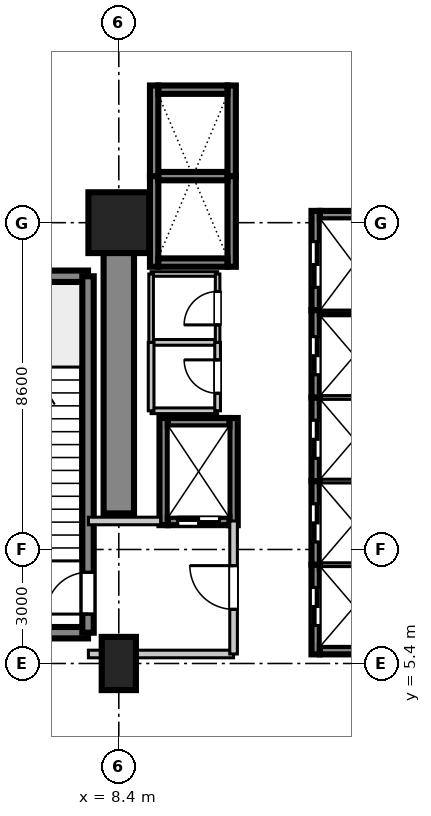
"""IFC4 building model, lengths in metres.
Left out: names, types, materials, properties, quantities, classifications, styles, units other than length and angle.
Written with IfcOpenShell. Run it as: python <this file> out.ifc"""

import sys

from ifc_helpers import new_model, si_unit, direction, frame, frame_2d, origin, origin_2d, place, context, subcontext, project, spatial, rectangle, extrude, source, transform, mapped, element, fill, save


model = new_model("IFC4")
c1 = context("Model", 3, precision=1e-05, world=origin(), true_north=direction((0.0, 1.0)))
c2 = subcontext(c1, "Body", "Model", "MODEL_VIEW")
j1 = project(units=[si_unit("LENGTHUNIT", "METRE"), si_unit("PLANEANGLEUNIT", "RADIAN")], contexts=[c1])
p1 = place(None, origin())
s1 = spatial("IfcSite", under=j1, at=p1, CompositionType="ELEMENT")
p2 = place(p1, origin())
s2 = spatial("IfcBuilding", under=s1, at=p2, CompositionType="ELEMENT")
p3 = place(p2, frame((0.0, 0.0, 10.8)))
s3 = spatial("IfcBuildingStorey", under=s2, at=p3, CompositionType="ELEMENT", Elevation=10.8)
m1 = source(origin(), c2, "Body", "SweptSolid", [
    extrude(rectangle(XDim=0.9, YDim=1.4, at=origin_2d()), origin(), (0.0, 0.0, 1.0), 5.355),
])
p4 = place(p3, frame((8.4, 5.4, 0.0), z_axis=(0.0, 0.0, 1.0), x_axis=(1.0, 0.0, 0.0)))
e1 = element("IfcColumn", 1, at=p4, inside=s3, PredefinedType="PILASTER", context=c2, shape_type="MappedRepresentation", body=[
    mapped(m1, transform((0.0, 0.0, 0.0), scale=1.0)),
])
m2 = source(origin(), c2, "Body", "SweptSolid", [
    extrude(rectangle(XDim=1.6, YDim=1.6, at=origin_2d()), origin(), (0.0, 0.0, 1.0), 5.355),
])
p5 = place(p3, frame((8.4, 17.0, 0.0), z_axis=(0.0, 0.0, 1.0), x_axis=(1.0, 0.0, 0.0)))
e2 = element("IfcColumn", 2, at=p5, inside=s3, PredefinedType="COLUMN", context=c2, shape_type="MappedRepresentation", body=[
    mapped(m2, transform((0.0, 0.0, 0.0), scale=1.0)),
])
m3 = source(origin(), c2, "Body", "SweptSolid", [
    extrude(rectangle(XDim=7.65, YDim=0.8, at=frame_2d((3.825, 0.0))), origin(), (0.0, 0.0, 1.0), 5.06),
])
p6 = place(p3, frame((8.4, 9.35, 0.0), z_axis=(0.0, 0.0, 1.0), x_axis=(0.0, 1.0, 0.0)))
e3 = element("IfcWall", 3, at=p6, inside=s3, PredefinedType="SHEAR", context=c2, shape_type="MappedRepresentation", body=[
    mapped(m3, transform((0.0, 0.0, 0.0), scale=1.0)),
])
m4 = source(origin(), c2, "Body", "SweptSolid", [
    extrude(rectangle(XDim=3.98, YDim=0.3, at=frame_2d((1.99, 0.0))), origin(), (0.0, 0.0, 1.0), 5.06),
])
for number, where, z_axis, x_axis in (
    (4, (3.61, 6.21, 0.0), (0.0, 0.0, 1.0), (1.0, 0.0, 0.0)),
    (5, (3.61, 15.59, 0.0), (0.0, 0.0, 1.0), (1.0, 0.0, 0.0)),
):
    element("IfcWall", number, at=place(p3, frame(where, z_axis=z_axis, x_axis=x_axis)), inside=s3, PredefinedType="SHEAR", context=c2, shape_type="MappedRepresentation", body=[
        mapped(m4, transform((0.0, 0.0, 0.0), scale=1.0)),
    ])
m5 = source(origin(), c2, "Body", "SweptSolid", [
    extrude(rectangle(XDim=9.38, YDim=0.3, at=frame_2d((4.69, 0.0))), origin(), (0.0, 0.0, 1.0), 5.06),
])
p7 = place(p3, frame((7.59, 6.21, 0.0), z_axis=(0.0, 0.0, 1.0), x_axis=(0.0, 1.0, 0.0)))
e6 = element("IfcWall", 6, at=p7, inside=s3, PredefinedType="SHEAR", context=c2, shape_type="MappedRepresentation", body=[
    mapped(m5, transform((0.0, 0.0, 0.0), scale=1.0)),
])
p8 = place(p7, frame((0.49, 0.0, 0.0)))
e7 = element("IfcOpeningElement", 7, at=p8, cuts=e6, PredefinedType="OPENING", context=c2, shape_type="SweptSolid", body=[
    extrude(rectangle(XDim=1.1, YDim=2.15, at=frame_2d((0.55, 1.075))), frame((0.0, 0.16, 0.0), z_axis=(0.0, -1.0, 0.0), x_axis=(1.0, 0.0, 0.0)), (0.0, 0.0, 1.0), 0.32),
])
m6 = source(origin(), c2, "Body", "SweptSolid", [
    extrude(rectangle(XDim=2.36, YDim=0.22, at=frame_2d((1.18, 0.0))), origin(), (0.0, 0.0, 1.0), 5.06),
])
p9 = place(p3, frame((13.58, 5.64, 0.0), z_axis=(0.0, 0.0, 1.0), x_axis=(0.0, 1.0, 0.0)))
e8 = element("IfcWall", 8, at=p9, inside=s3, PredefinedType="SHEAR", context=c2, shape_type="MappedRepresentation", body=[
    mapped(m6, transform((0.0, 0.0, 0.0), scale=1.0)),
])
p10 = place(p9, frame((0.76, 0.0, 0.0)))
e9 = element("IfcOpeningElement", 9, at=p10, cuts=e8, PredefinedType="OPENING", context=c2, shape_type="SweptSolid", body=[
    extrude(rectangle(XDim=1.0, YDim=2.2, at=frame_2d((0.5, 1.1))), frame((0.0, 0.12, 0.0), z_axis=(0.0, -1.0, 0.0), x_axis=(1.0, 0.0, 0.0)), (0.0, 0.0, 1.0), 0.24),
])
m7 = source(origin(), c2, "Body", "SweptSolid", [
    extrude(rectangle(XDim=1.82, YDim=0.22, at=frame_2d((0.91, 0.0))), origin(), (0.0, 0.0, 1.0), 5.06),
])
p11 = place(p3, frame((13.69, 5.75, 0.0), z_axis=(0.0, 0.0, 1.0), x_axis=(1.0, 0.0, 0.0)))
e10 = element("IfcWall", 10, at=p11, inside=s3, PredefinedType="SHEAR", context=c2, shape_type="MappedRepresentation", body=[
    mapped(m7, transform((0.0, 0.0, 0.0), scale=1.0)),
])
m8 = source(origin(), c2, "Body", "SweptSolid", [
    extrude(rectangle(XDim=1.82, YDim=0.22, at=frame_2d((0.91, 0.0))), origin(), (0.0, 0.0, 1.0), 5.4),
])
p12 = place(p3, frame((13.69, 8.0, 0.0), z_axis=(0.0, 0.0, 1.0), x_axis=(1.0, 0.0, 0.0)))
e11 = element("IfcWall", 11, at=p12, inside=s3, PredefinedType="SHEAR", context=c2, shape_type="MappedRepresentation", body=[
    mapped(m8, transform((0.0, 0.0, 0.0), scale=1.0)),
])
m9 = source(origin(), c2, "Body", "SweptSolid", [
    extrude(rectangle(XDim=2.2, YDim=0.22, at=frame_2d((1.1, 0.0))), origin(), (0.0, 0.0, 1.0), 5.06),
])
p13 = place(p3, frame((13.58, 8.0, 0.0), z_axis=(0.0, 0.0, 1.0), x_axis=(0.0, 1.0, 0.0)))
e12 = element("IfcWall", 12, at=p13, inside=s3, PredefinedType="SHEAR", context=c2, shape_type="MappedRepresentation", body=[
    mapped(m9, transform((0.0, 0.0, 0.0), scale=1.0)),
])
p14 = place(p13, frame((0.6, 0.0, 0.0)))
e13 = element("IfcOpeningElement", 13, at=p14, cuts=e12, PredefinedType="OPENING", context=c2, shape_type="SweptSolid", body=[
    extrude(rectangle(XDim=1.0, YDim=2.2, at=frame_2d((0.5, 1.1))), frame((0.0, 0.12, 0.0), z_axis=(0.0, -1.0, 0.0), x_axis=(1.0, 0.0, 0.0)), (0.0, 0.0, 1.0), 0.24),
])
p15 = place(p3, frame((13.69, 10.2, 0.0), z_axis=(0.0, 0.0, 1.0), x_axis=(1.0, 0.0, 0.0)))
e14 = element("IfcWall", 14, at=p15, inside=s3, PredefinedType="SHEAR", context=c2, shape_type="MappedRepresentation", body=[
    mapped(m8, transform((0.0, 0.0, 0.0), scale=1.0)),
])
p16 = place(p3, frame((13.58, 10.2, 0.0), z_axis=(0.0, 0.0, 1.0), x_axis=(0.0, 1.0, 0.0)))
e15 = element("IfcWall", 15, at=p16, inside=s3, PredefinedType="SHEAR", context=c2, shape_type="MappedRepresentation", body=[
    mapped(m9, transform((0.0, 0.0, 0.0), scale=1.0)),
])
p17 = place(p16, frame((0.6, 0.0, 0.0)))
e16 = element("IfcOpeningElement", 16, at=p17, cuts=e15, PredefinedType="OPENING", context=c2, shape_type="SweptSolid", body=[
    extrude(rectangle(XDim=1.0, YDim=2.2, at=frame_2d((0.5, 1.1))), frame((0.0, 0.12, 0.0), z_axis=(0.0, -1.0, 0.0), x_axis=(1.0, 0.0, 0.0)), (0.0, 0.0, 1.0), 0.24),
])
p18 = place(p3, frame((13.69, 12.4, 0.0), z_axis=(0.0, 0.0, 1.0), x_axis=(1.0, 0.0, 0.0)))
e17 = element("IfcWall", 17, at=p18, inside=s3, PredefinedType="SHEAR", context=c2, shape_type="MappedRepresentation", body=[
    mapped(m8, transform((0.0, 0.0, 0.0), scale=1.0)),
])
m10 = source(origin(), c2, "Body", "SweptSolid", [
    extrude(rectangle(XDim=2.3, YDim=0.22, at=frame_2d((1.15, 0.0))), origin(), (0.0, 0.0, 1.0), 5.06),
])
p19 = place(p3, frame((13.58, 12.4, 0.0), z_axis=(0.0, 0.0, 1.0), x_axis=(0.0, 1.0, 0.0)))
e18 = element("IfcWall", 18, at=p19, inside=s3, PredefinedType="SHEAR", context=c2, shape_type="MappedRepresentation", body=[
    mapped(m10, transform((0.0, 0.0, 0.0), scale=1.0)),
])
p20 = place(p19, frame((0.6, 0.0, 0.0)))
e19 = element("IfcOpeningElement", 19, at=p20, cuts=e18, PredefinedType="OPENING", context=c2, shape_type="SweptSolid", body=[
    extrude(rectangle(XDim=1.0, YDim=2.2, at=frame_2d((0.5, 1.1))), frame((0.0, 0.12, 0.0), z_axis=(0.0, -1.0, 0.0), x_axis=(1.0, 0.0, 0.0)), (0.0, 0.0, 1.0), 0.24),
])
p21 = place(p3, frame((13.69, 14.7, 0.0), z_axis=(0.0, 0.0, 1.0), x_axis=(1.0, 0.0, 0.0)))
e20 = element("IfcWall", 20, at=p21, inside=s3, PredefinedType="SHEAR", context=c2, shape_type="MappedRepresentation", body=[
    mapped(m8, transform((0.0, 0.0, 0.0), scale=1.0)),
])
m11 = source(origin(), c2, "Body", "SweptSolid", [
    extrude(rectangle(XDim=2.385, YDim=0.22, at=frame_2d((1.192, 0.0))), origin(), (0.0, 0.0, 1.0), 5.06),
])
for number, where, z_axis, x_axis in (
    (21, (9.33, 15.84, 0.0), (0.0, 0.0, 1.0), (0.0, 1.0, 0.0)),
    (22, (11.37, 15.84, 0.0), (0.0, 0.0, 1.0), (0.0, 1.0, 0.0)),
):
    element("IfcWall", number, at=place(p3, frame(where, z_axis=z_axis, x_axis=x_axis)), inside=s3, PredefinedType="SHEAR", context=c2, shape_type="MappedRepresentation", body=[
        mapped(m11, transform((0.0, 0.0, 0.0), scale=1.0)),
    ])
p22 = place(p3, frame((9.44, 15.95, 0.0), z_axis=(0.0, 0.0, 1.0), x_axis=(1.0, 0.0, 0.0)))
e23 = element("IfcWall", 23, at=p22, inside=s3, PredefinedType="SHEAR", context=c2, shape_type="MappedRepresentation", body=[
    mapped(m7, transform((0.0, 0.0, 0.0), scale=1.0)),
])
p23 = place(p3, frame((9.44, 18.225, 0.0), z_axis=(0.0, 0.0, 1.0), x_axis=(1.0, 0.0, 0.0)))
e24 = element("IfcWall", 24, at=p23, inside=s3, PredefinedType="SHEAR", context=c2, shape_type="MappedRepresentation", body=[
    mapped(m8, transform((0.0, 0.0, 0.0), scale=1.0)),
])
for number, where, z_axis, x_axis in (
    (25, (9.33, 18.225, 0.0), (0.0, 0.0, 1.0), (0.0, 1.0, 0.0)),
    (26, (11.37, 18.225, 0.0), (0.0, 0.0, 1.0), (0.0, 1.0, 0.0)),
):
    element("IfcWall", number, at=place(p3, frame(where, z_axis=z_axis, x_axis=x_axis)), inside=s3, PredefinedType="SHEAR", context=c2, shape_type="MappedRepresentation", body=[
        mapped(m11, transform((0.0, 0.0, 0.0), scale=1.0)),
    ])
p24 = place(p3, frame((9.44, 20.5, 0.0), z_axis=(0.0, 0.0, 1.0), x_axis=(1.0, 0.0, 0.0)))
e27 = element("IfcWall", 27, at=p24, inside=s3, PredefinedType="SHEAR", context=c2, shape_type="MappedRepresentation", body=[
    mapped(m7, transform((0.0, 0.0, 0.0), scale=1.0)),
])
m12 = source(origin(), c2, "Body", "SweptSolid", [
    extrude(rectangle(XDim=2.82, YDim=0.22, at=frame_2d((1.41, 0.0))), origin(), (0.0, 0.0, 1.0), 5.06),
])
for number, where, z_axis, x_axis in (
    (28, (9.58, 9.04, 0.0), (0.0, 0.0, 1.0), (0.0, 1.0, 0.0)),
    (29, (11.42, 9.04, 0.0), (0.0, 0.0, 1.0), (0.0, 1.0, 0.0)),
):
    element("IfcWall", number, at=place(p3, frame(where, z_axis=z_axis, x_axis=x_axis)), inside=s3, PredefinedType="SHEAR", context=c2, shape_type="MappedRepresentation", body=[
        mapped(m12, transform((0.0, 0.0, 0.0), scale=1.0)),
    ])
m13 = source(origin(), c2, "Body", "SweptSolid", [
    extrude(rectangle(XDim=1.62, YDim=0.22, at=frame_2d((0.81, 0.0))), origin(), (0.0, 0.0, 1.0), 5.06),
])
p25 = place(p3, frame((9.69, 9.15, 0.0), z_axis=(0.0, 0.0, 1.0), x_axis=(1.0, 0.0, 0.0)))
e30 = element("IfcWall", 30, at=p25, inside=s3, PredefinedType="SHEAR", context=c2, shape_type="MappedRepresentation", body=[
    mapped(m13, transform((0.0, 0.0, 0.0), scale=1.0)),
])
p26 = place(p25, frame((0.26, 0.0, 0.0)))
e31 = element("IfcOpeningElement", 31, at=p26, cuts=e30, PredefinedType="OPENING", context=c2, shape_type="SweptSolid", body=[
    extrude(rectangle(XDim=1.1, YDim=2.2, at=frame_2d((0.55, 1.1))), frame((0.0, 0.12, 0.0), z_axis=(0.0, -1.0, 0.0), x_axis=(1.0, 0.0, 0.0)), (0.0, 0.0, 1.0), 0.24),
])
p27 = place(p3, frame((9.69, 11.75, 0.0), z_axis=(0.0, 0.0, 1.0), x_axis=(1.0, 0.0, 0.0)))
e32 = element("IfcWall", 32, at=p27, inside=s3, PredefinedType="SHEAR", context=c2, shape_type="MappedRepresentation", body=[
    mapped(m13, transform((0.0, 0.0, 0.0), scale=1.0)),
])
m14 = source(origin(), c2, "Body", "SweptSolid", [
    extrude(rectangle(XDim=2.61, YDim=0.22, at=frame_2d((1.305, 0.0))), origin(), (0.0, 0.0, 1.0), 5.06),
])
p28 = place(p3, frame((13.58, 14.7, 0.0), z_axis=(0.0, 0.0, 1.0), x_axis=(0.0, 1.0, 0.0)))
e33 = element("IfcWall", 33, at=p28, inside=s3, PredefinedType="SHEAR", context=c2, shape_type="MappedRepresentation", body=[
    mapped(m14, transform((0.0, 0.0, 0.0), scale=1.0)),
])
p29 = place(p28, frame((0.6, 0.0, 0.0)))
e34 = element("IfcOpeningElement", 34, at=p29, cuts=e33, PredefinedType="OPENING", context=c2, shape_type="SweptSolid", body=[
    extrude(rectangle(XDim=1.2, YDim=2.2, at=frame_2d((0.6, 1.1))), frame((0.0, 0.12, 0.0), z_axis=(0.0, -1.0, 0.0), x_axis=(1.0, 0.0, 0.0)), (0.0, 0.0, 1.0), 0.24),
])
p30 = place(p3, frame((13.69, 17.2, 0.0), z_axis=(0.0, 0.0, 1.0), x_axis=(1.0, 0.0, 0.0)))
e35 = element("IfcWall", 35, at=p30, inside=s3, PredefinedType="SHEAR", context=c2, shape_type="MappedRepresentation", body=[
    mapped(m7, transform((0.0, 0.0, 0.0), scale=1.0)),
])
m15 = source(origin(), c2, "Body", "SweptSolid", [
    extrude(rectangle(XDim=3.82, YDim=0.2, at=frame_2d((1.91, 0.0))), origin(), (0.0, 0.0, 1.0), 3.4),
])
p31 = place(p3, frame((7.6, 5.65, 0.0), z_axis=(0.0, 0.0, 1.0), x_axis=(1.0, 0.0, 0.0)))
e36 = element("IfcWall", 36, at=p31, inside=s3, PredefinedType="PARTITIONING", context=c2, shape_type="MappedRepresentation", body=[
    mapped(m15, transform((0.0, 0.0, 0.0), scale=1.0)),
])
m16 = source(origin(), c2, "Body", "SweptSolid", [
    extrude(rectangle(XDim=1.9, YDim=0.2, at=frame_2d((0.95, 0.0))), origin(), (0.0, 0.0, 1.0), 3.4),
])
p32 = place(p3, frame((7.6, 9.15, 0.0), z_axis=(0.0, 0.0, 1.0), x_axis=(1.0, 0.0, 0.0)))
e37 = element("IfcWall", 37, at=p32, inside=s3, PredefinedType="PARTITIONING", context=c2, shape_type="MappedRepresentation", body=[
    mapped(m16, transform((0.0, 0.0, 0.0), scale=1.0)),
])
m17 = source(origin(), c2, "Body", "SweptSolid", [
    extrude(rectangle(XDim=3.5, YDim=0.2, at=frame_2d((1.75, 0.0))), origin(), (0.0, 0.0, 1.0), 3.4),
])
p33 = place(p3, frame((11.42, 5.65, 0.0), z_axis=(0.0, 0.0, 1.0), x_axis=(0.0, 1.0, 0.0)))
e38 = element("IfcWall", 38, at=p33, inside=s3, PredefinedType="PARTITIONING", context=c2, shape_type="MappedRepresentation", body=[
    mapped(m17, transform((0.0, 0.0, 0.0), scale=1.0)),
])
p34 = place(p33, frame((1.175, 0.0, 0.0)))
e39 = element("IfcOpeningElement", 39, at=p34, cuts=e38, PredefinedType="OPENING", context=c2, shape_type="SweptSolid", body=[
    extrude(rectangle(XDim=1.15, YDim=2.15, at=frame_2d((0.575, 1.075))), frame((0.0, 0.11, 0.0), z_axis=(0.0, -1.0, 0.0), x_axis=(1.0, 0.0, 0.0)), (0.0, 0.0, 1.0), 0.22),
])
m18 = source(origin(), c2, "Body", "SweptSolid", [
    extrude(rectangle(XDim=1.75, YDim=0.15, at=frame_2d((0.875, 0.0))), origin(), (0.0, 0.0, 1.0), 3.4),
])
for number, where, z_axis, x_axis in (
    (40, (9.25, 12.05, 0.0), (0.0, 0.0, 1.0), (1.0, 0.0, 0.0)),
    (41, (9.25, 13.85, 0.0), (0.0, 0.0, 1.0), (1.0, 0.0, 0.0)),
):
    element("IfcWall", number, at=place(p3, frame(where, z_axis=z_axis, x_axis=x_axis)), inside=s3, PredefinedType="PARTITIONING", context=c2, shape_type="MappedRepresentation", body=[
        mapped(m18, transform((0.0, 0.0, 0.0), scale=1.0)),
    ])
m19 = source(origin(), c2, "Body", "SweptSolid", [
    extrude(rectangle(XDim=1.8, YDim=0.15, at=frame_2d((0.9, 0.0))), origin(), (0.0, 0.0, 1.0), 3.4),
])
p35 = place(p3, frame((9.25, 12.05, 0.0), z_axis=(0.0, 0.0, 1.0), x_axis=(0.0, 1.0, 0.0)))
e42 = element("IfcWall", 42, at=p35, inside=s3, PredefinedType="PARTITIONING", context=c2, shape_type="MappedRepresentation", body=[
    mapped(m19, transform((0.0, 0.0, 0.0), scale=1.0)),
])
p36 = place(p3, frame((11.0, 12.05, 0.0), z_axis=(0.0, 0.0, 1.0), x_axis=(0.0, 1.0, 0.0)))
e43 = element("IfcWall", 43, at=p36, inside=s3, PredefinedType="PARTITIONING", context=c2, shape_type="MappedRepresentation", body=[
    mapped(m19, transform((0.0, 0.0, 0.0), scale=1.0)),
])
p37 = place(p36, frame((0.46, 0.0, 0.0)))
e44 = element("IfcOpeningElement", 44, at=p37, cuts=e43, PredefinedType="OPENING", context=c2, shape_type="SweptSolid", body=[
    extrude(rectangle(XDim=0.88, YDim=2.1, at=frame_2d((0.44, 1.05))), frame((0.0, 0.085, 0.0), z_axis=(0.0, -1.0, 0.0), x_axis=(1.0, 0.0, 0.0)), (0.0, 0.0, 1.0), 0.17),
])
m20 = source(origin(), c2, "Body", "SweptSolid", [
    extrude(rectangle(XDim=1.75, YDim=0.12, at=frame_2d((0.875, 0.0))), origin(), (0.0, 0.0, 1.0), 3.4),
])
p38 = place(p3, frame((9.25, 15.65, 0.0), z_axis=(0.0, 0.0, 1.0), x_axis=(1.0, 0.0, 0.0)))
e45 = element("IfcWall", 45, at=p38, inside=s3, PredefinedType="PARTITIONING", context=c2, shape_type="MappedRepresentation", body=[
    mapped(m20, transform((0.0, 0.0, 0.0), scale=1.0)),
])
m21 = source(origin(), c2, "Body", "SweptSolid", [
    extrude(rectangle(XDim=1.8, YDim=0.12, at=frame_2d((0.9, 0.0))), origin(), (0.0, 0.0, 1.0), 3.4),
])
p39 = place(p3, frame((9.25, 13.85, 0.0), z_axis=(0.0, 0.0, 1.0), x_axis=(0.0, 1.0, 0.0)))
e46 = element("IfcWall", 46, at=p39, inside=s3, PredefinedType="PARTITIONING", context=c2, shape_type="MappedRepresentation", body=[
    mapped(m21, transform((0.0, 0.0, 0.0), scale=1.0)),
])
p40 = place(p3, frame((11.0, 13.85, 0.0), z_axis=(0.0, 0.0, 1.0), x_axis=(0.0, 1.0, 0.0)))
e47 = element("IfcWall", 47, at=p40, inside=s3, PredefinedType="PARTITIONING", context=c2, shape_type="MappedRepresentation", body=[
    mapped(m21, transform((0.0, 0.0, 0.0), scale=1.0)),
])
p41 = place(p40, frame((0.46, 0.0, 0.0)))
e48 = element("IfcOpeningElement", 48, at=p41, cuts=e47, PredefinedType="OPENING", context=c2, shape_type="SweptSolid", body=[
    extrude(rectangle(XDim=0.88, YDim=2.1, at=frame_2d((0.44, 1.05))), frame((0.0, 0.07, 0.0), z_axis=(0.0, -1.0, 0.0), x_axis=(1.0, 0.0, 0.0)), (0.0, 0.0, 1.0), 0.14),
])
m22 = source(origin(), c2, "Body", "SweptSolid", [
    extrude(rectangle(XDim=1.1, YDim=2.15, at=frame_2d((0.55, 1.075))), frame((0.0, 0.025, 0.0), z_axis=(0.0, -1.0, 0.0), x_axis=(1.0, 0.0, 0.0)), (0.0, 0.0, 1.0), 0.05),
])
p42 = place(p8, origin())
e49 = element("IfcDoor", 49, at=p42, inside=s3, OperationType="SINGLE_SWING_LEFT", PredefinedType="DOOR", context=c2, shape_type="MappedRepresentation", body=[
    mapped(m22, transform((0.0, 0.0, 0.0), scale=1.0)),
])
fill(e7, e49)
m23 = source(origin(), c2, "Body", "SweptSolid", [
    extrude(rectangle(XDim=1.0, YDim=2.2, at=frame_2d((0.5, 1.1))), frame((0.0, 0.025, 0.0), z_axis=(0.0, -1.0, 0.0), x_axis=(1.0, 0.0, 0.0)), (0.0, 0.0, 1.0), 0.05),
])
p43 = place(p10, origin())
e50 = element("IfcDoor", 50, at=p43, inside=s3, OperationType="DOUBLE_DOOR_SLIDING", PredefinedType="DOOR", context=c2, shape_type="MappedRepresentation", body=[
    mapped(m23, transform((0.0, 0.0, 0.0), scale=1.0)),
])
fill(e9, e50)
p44 = place(p14, origin())
e51 = element("IfcDoor", 51, at=p44, inside=s3, OperationType="DOUBLE_DOOR_SLIDING", PredefinedType="DOOR", context=c2, shape_type="MappedRepresentation", body=[
    mapped(m23, transform((0.0, 0.0, 0.0), scale=1.0)),
])
fill(e13, e51)
p45 = place(p17, origin())
e52 = element("IfcDoor", 52, at=p45, inside=s3, OperationType="DOUBLE_DOOR_SLIDING", PredefinedType="DOOR", context=c2, shape_type="MappedRepresentation", body=[
    mapped(m23, transform((0.0, 0.0, 0.0), scale=1.0)),
])
fill(e16, e52)
p46 = place(p20, origin())
e53 = element("IfcDoor", 53, at=p46, inside=s3, OperationType="DOUBLE_DOOR_SLIDING", PredefinedType="DOOR", context=c2, shape_type="MappedRepresentation", body=[
    mapped(m23, transform((0.0, 0.0, 0.0), scale=1.0)),
])
fill(e19, e53)
m24 = source(origin(), c2, "Body", "SweptSolid", [
    extrude(rectangle(XDim=1.1, YDim=2.2, at=frame_2d((0.55, 1.1))), frame((0.0, 0.025, 0.0), z_axis=(0.0, -1.0, 0.0), x_axis=(1.0, 0.0, 0.0)), (0.0, 0.0, 1.0), 0.05),
])
p47 = place(p26, frame((1.1, 0.0, 0.0), z_axis=(0.0, 0.0, 1.0), x_axis=(-1.0, 0.0, 0.0)))
e54 = element("IfcDoor", 54, at=p47, inside=s3, OperationType="DOUBLE_DOOR_SLIDING", PredefinedType="DOOR", context=c2, shape_type="MappedRepresentation", body=[
    mapped(m24, transform((0.0, 0.0, 0.0), scale=1.0)),
])
fill(e31, e54)
m25 = source(origin(), c2, "Body", "SweptSolid", [
    extrude(rectangle(XDim=1.2, YDim=2.2, at=frame_2d((0.6, 1.1))), frame((0.0, 0.025, 0.0), z_axis=(0.0, -1.0, 0.0), x_axis=(1.0, 0.0, 0.0)), (0.0, 0.0, 1.0), 0.05),
])
p48 = place(p29, origin())
e55 = element("IfcDoor", 55, at=p48, inside=s3, OperationType="DOUBLE_DOOR_SLIDING", PredefinedType="DOOR", context=c2, shape_type="MappedRepresentation", body=[
    mapped(m25, transform((0.0, 0.0, 0.0), scale=1.0)),
])
fill(e34, e55)
m26 = source(origin(), c2, "Body", "SweptSolid", [
    extrude(rectangle(XDim=1.15, YDim=2.15, at=frame_2d((0.575, 1.075))), frame((0.0, 0.025, 0.0), z_axis=(0.0, -1.0, 0.0), x_axis=(1.0, 0.0, 0.0)), (0.0, 0.0, 1.0), 0.05),
])
p49 = place(p34, frame((1.15, 0.0, 0.0), z_axis=(0.0, 0.0, 1.0), x_axis=(-1.0, 0.0, 0.0)))
e56 = element("IfcDoor", 56, at=p49, inside=s3, OperationType="SINGLE_SWING_RIGHT", PredefinedType="DOOR", context=c2, shape_type="MappedRepresentation", body=[
    mapped(m26, transform((0.0, 0.0, 0.0), scale=1.0)),
])
fill(e39, e56)
m27 = source(origin(), c2, "Body", "SweptSolid", [
    extrude(rectangle(XDim=0.88, YDim=2.1, at=frame_2d((0.44, 1.05))), frame((0.0, 0.025, 0.0), z_axis=(0.0, -1.0, 0.0), x_axis=(1.0, 0.0, 0.0)), (0.0, 0.0, 1.0), 0.05),
])
p50 = place(p37, origin())
e57 = element("IfcDoor", 57, at=p50, inside=s3, OperationType="SINGLE_SWING_RIGHT", PredefinedType="DOOR", context=c2, shape_type="MappedRepresentation", body=[
    mapped(m27, transform((0.0, 0.0, 0.0), scale=1.0)),
])
fill(e44, e57)
p51 = place(p41, origin())
e58 = element("IfcDoor", 58, at=p51, inside=s3, OperationType="SINGLE_SWING_LEFT", PredefinedType="DOOR", context=c2, shape_type="MappedRepresentation", body=[
    mapped(m27, transform((0.0, 0.0, 0.0), scale=1.0)),
])
fill(e48, e58)
save(model, sys.argv[1])
